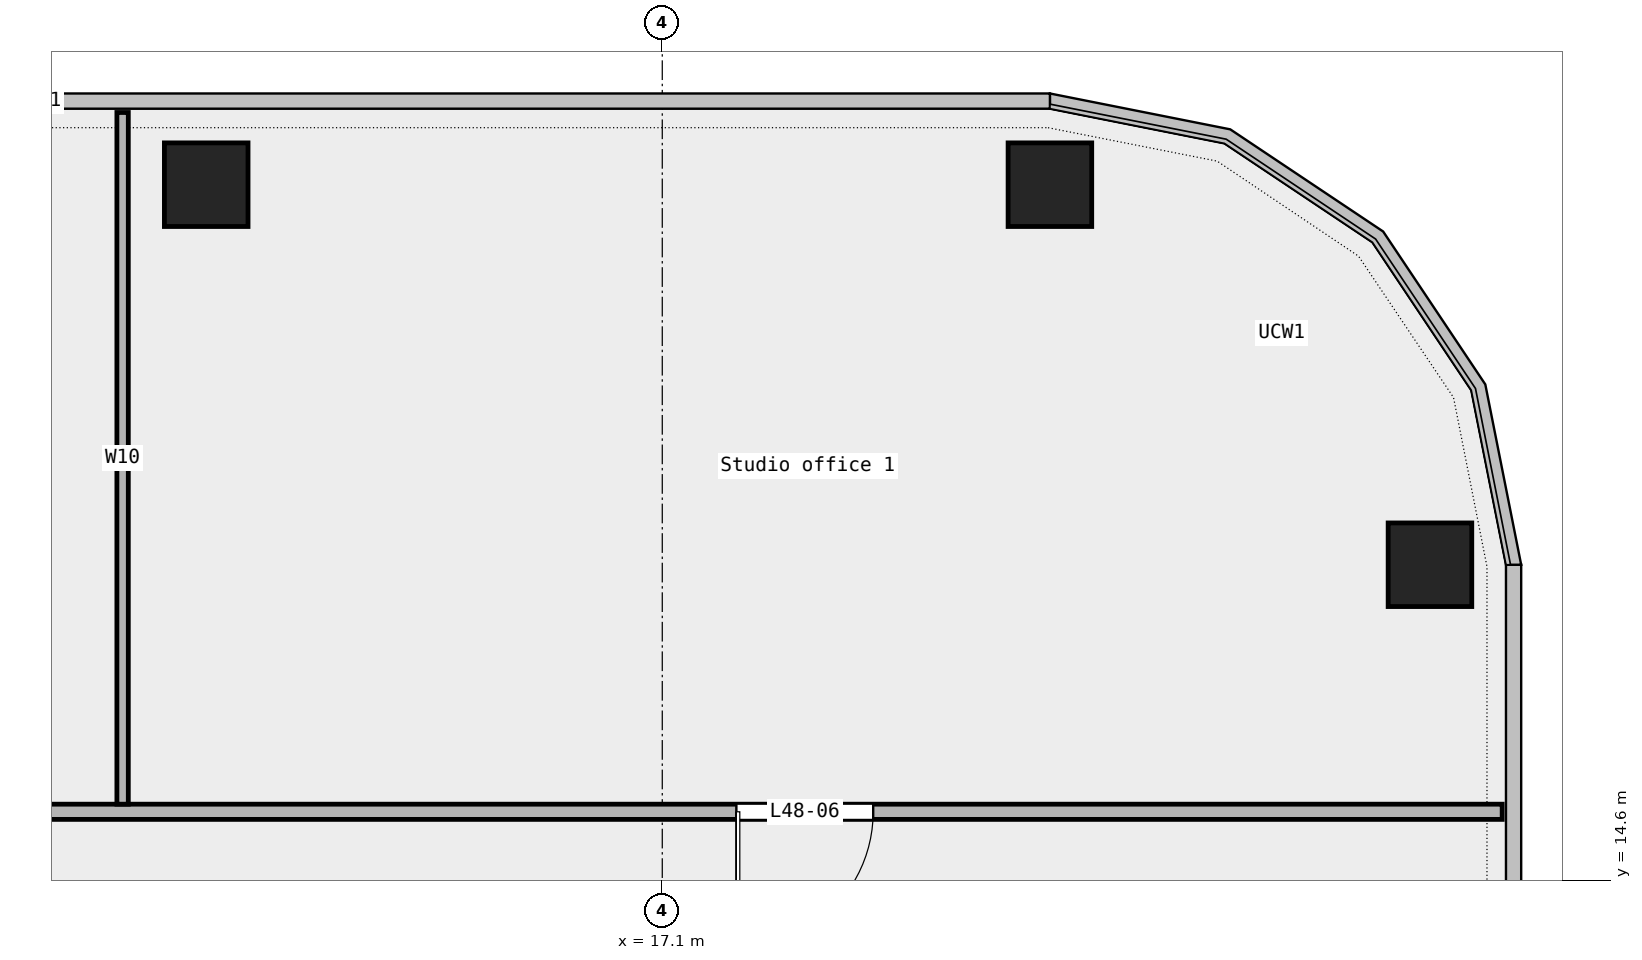
"""IFC4 building model, lengths in metres.
Left out: names, types, materials, properties, quantities, classifications, styles, units other than length and angle.
Written with IfcOpenShell. Run it as: python <this file> out.ifc"""

import sys

from ifc_helpers import new_model, si_unit, direction, frame, frame_2d, origin, origin_2d, place, context, subcontext, project, spatial, rectangle, extrude, element, fill, save


model = new_model("IFC4")
c1 = context("Model", 3, precision=1e-05, world=origin(), true_north=direction((0.0, 1.0)))
c2 = subcontext(c1, "Body", "Model", "MODEL_VIEW")
j1 = project(units=[si_unit("LENGTHUNIT", "METRE"), si_unit("PLANEANGLEUNIT", "RADIAN")], contexts=[c1])
p1 = place(None, origin())
s1 = spatial("IfcSite", under=j1, at=p1, CompositionType="ELEMENT")
p2 = place(p1, origin())
s2 = spatial("IfcBuilding", under=s1, at=p2, CompositionType="ELEMENT")
p3 = place(p2, frame((0.0, 0.0, 227.0)))
s3 = spatial("IfcBuildingStorey", under=s2, at=p3, CompositionType="ELEMENT", Elevation=227.0)
for number, where, z_axis, x_axis in (
    (1, (27.2, 18.75, 0.0), (0.0, 0.0, 1.0), (1.0, 0.0, 0.0)),
    (2, (22.2, 23.75, 0.0), (0.0, 0.0, 1.0), (1.0, 0.0, 0.0)),
    (3, (11.1, 23.75, 0.0), (0.0, 0.0, 1.0), (1.0, 0.0, 0.0)),
):
    element("IfcColumn", number, at=place(p3, frame(where, z_axis=z_axis, x_axis=x_axis)), inside=s3, PredefinedType="COLUMN", context=c2, shape_type="SweptSolid", body=[
        extrude(rectangle(XDim=1.1, YDim=1.1, at=origin_2d()), origin(), (0.0, 0.0, 1.0), 3.6),
    ])
p4 = place(p3, frame((-28.15, 15.5, 0.0), z_axis=(0.0, 0.0, 1.0), x_axis=(1.0, 0.0, 0.0)))
e4 = element("IfcWall", 4, at=p4, inside=s3, PredefinedType="PARTITIONING", context=c2, shape_type="SweptSolid", body=[
    extrude(rectangle(XDim=56.3, YDim=0.2, at=frame_2d((28.15, 0.0))), origin(), (0.0, 0.0, 1.0), 3.6),
])
p5 = place(p4, frame((16.3, 0.0, 0.0)))
e5 = element("IfcOpeningElement", 5, at=p5, cuts=e4, PredefinedType="OPENING", context=c2, shape_type="SweptSolid", body=[
    extrude(rectangle(XDim=1.5, YDim=2.1, at=frame_2d((0.75, 1.05))), frame((0.0, 0.112, 0.0), z_axis=(0.0, -1.0, 0.0), x_axis=(1.0, 0.0, 0.0)), (0.0, 0.0, 1.0), 0.224),
])
p6 = place(p4, frame((46.225, 0.0, 0.0)))
e6 = element("IfcOpeningElement", 6, at=p6, cuts=e4, PredefinedType="OPENING", context=c2, shape_type="SweptSolid", body=[
    extrude(rectangle(XDim=1.8, YDim=2.1, at=frame_2d((0.9, 1.05))), frame((0.0, 0.112, 0.0), z_axis=(0.0, -1.0, 0.0), x_axis=(1.0, 0.0, 0.0)), (0.0, 0.0, 1.0), 0.224),
])
p7 = place(p4, frame((30.18, 0.0, 0.0)))
e7 = element("IfcOpeningElement", 7, at=p7, cuts=e4, PredefinedType="OPENING", context=c2, shape_type="SweptSolid", body=[
    extrude(rectangle(XDim=1.5, YDim=2.1, at=frame_2d((0.75, 1.05))), frame((0.0, 0.112, 0.0), z_axis=(0.0, -1.0, 0.0), x_axis=(1.0, 0.0, 0.0)), (0.0, 0.0, 1.0), 0.224),
])
p8 = place(p4, frame((4.695, 0.0, 0.0)))
e8 = element("IfcOpeningElement", 8, at=p8, cuts=e4, PredefinedType="OPENING", context=c2, shape_type="SweptSolid", body=[
    extrude(rectangle(XDim=1.2, YDim=2.1, at=frame_2d((0.6, 1.05))), frame((0.0, 0.112, 0.0), z_axis=(0.0, -1.0, 0.0), x_axis=(1.0, 0.0, 0.0)), (0.0, 0.0, 1.0), 0.224),
])
p9 = place(p3, frame((10.0, 15.6, 0.0), z_axis=(0.0, 0.0, 1.0), x_axis=(0.0, 1.0, 0.0)))
e9 = element("IfcWall", 9, at=p9, inside=s3, PredefinedType="PARTITIONING", context=c2, shape_type="SweptSolid", body=[
    extrude(rectangle(XDim=9.1, YDim=0.15, at=frame_2d((4.55, 0.0))), origin(), (0.0, 0.0, 1.0), 3.6),
])
p10 = place(p6, origin())
e10 = element("IfcDoor", 10, at=p10, inside=s3, OperationType="DOUBLE_DOOR_SINGLE_SWING", PredefinedType="DOOR", context=c2, shape_type="SweptSolid", body=[
    extrude(rectangle(XDim=1.8, YDim=2.1, at=frame_2d((0.9, 1.05))), frame((0.0, 0.025, 0.0), z_axis=(0.0, -1.0, 0.0), x_axis=(1.0, 0.0, 0.0)), (0.0, 0.0, 1.0), 0.05),
])
fill(e6, e10)
save(model, sys.argv[1])
